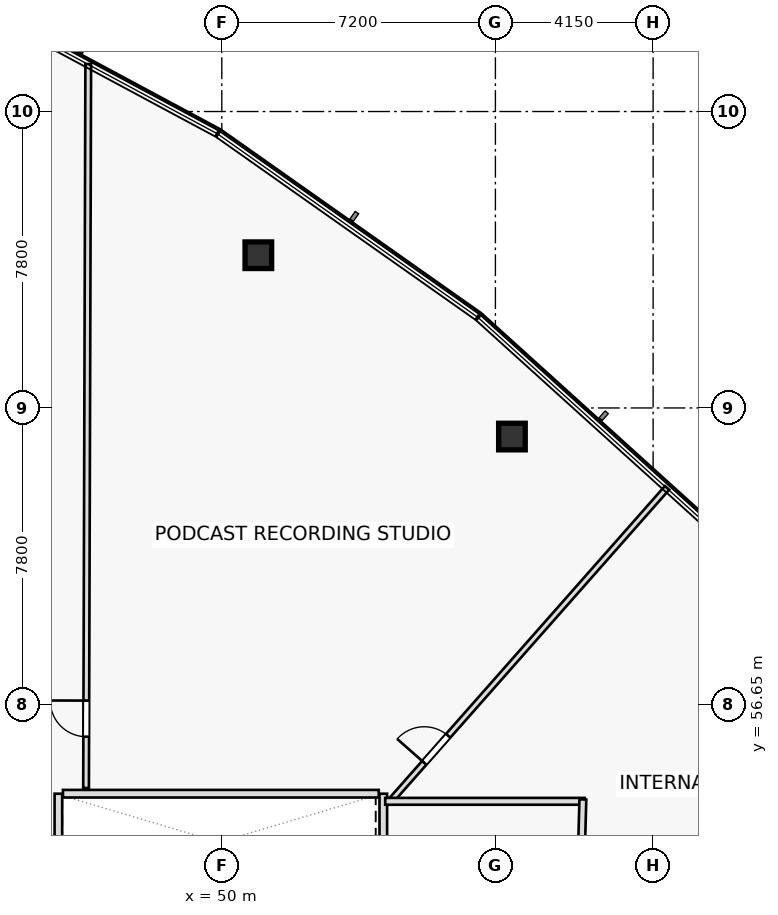
"""IFC4 building model, lengths in metres.
Left out: names, types, materials, properties, quantities, classifications, styles, units other than length and angle.
Written with IfcOpenShell. Run it as: python <this file> out.ifc"""

import sys

from ifc_helpers import new_model, si_unit, direction, frame, frame_2d, origin, origin_2d, place, context, subcontext, project, spatial, rectangle, hollow_rectangle, extrude, element, fill, save


model = new_model("IFC4")
c1 = context("Model", 3, precision=1e-05, world=origin(), true_north=direction((0.0, 1.0)))
c2 = subcontext(c1, "Body", "Model", "MODEL_VIEW")
j1 = project(units=[si_unit("LENGTHUNIT", "METRE"), si_unit("PLANEANGLEUNIT", "RADIAN")], contexts=[c1])
p1 = place(None, origin())
s1 = spatial("IfcSite", under=j1, at=p1, CompositionType="ELEMENT")
p2 = place(p1, origin())
s2 = spatial("IfcBuilding", under=s1, at=p2, CompositionType="ELEMENT")
p3 = place(p2, frame((0.0, 0.0, 86.1)))
s3 = spatial("IfcBuildingStorey", under=s2, at=p3, CompositionType="ELEMENT", Elevation=86.1)
for number, where, z_axis, x_axis in (
    (1, (57.635, 63.698, 0.0), (0.0, 0.0, 1.0), (1.0, 0.0, 0.0)),
    (2, (50.962, 68.469, 0.0), (0.0, 0.0, 1.0), (1.0, 0.0, 0.0)),
):
    element("IfcColumn", number, at=place(p3, frame(where, z_axis=z_axis, x_axis=x_axis)), inside=s3, PredefinedType="COLUMN", context=c2, shape_type="SweptSolid", body=[
        extrude(hollow_rectangle(XDim=0.7, YDim=0.7, WallThickness=0.04, at=origin_2d()), origin(), (0.0, 0.0, 1.0), 3.6),
    ])
for number, where, z_axis, x_axis in (
    (3, (45.7, 51.8, 0.0), (0.0, 0.0, 1.0), (0.0, 1.0, 0.0)),
    (4, (54.25, 51.8, 0.0), (0.0, 0.0, 1.0), (0.0, 1.0, 0.0)),
):
    element("IfcWall", number, at=place(p3, frame(where, z_axis=z_axis, x_axis=x_axis)), inside=s3, PredefinedType="PARTITIONING", context=c2, shape_type="SweptSolid", body=[
        extrude(rectangle(XDim=2.5, YDim=0.2, at=frame_2d((1.25, 0.0))), origin(), (0.0, 0.0, 1.0), 3.6),
    ])
p4 = place(p3, frame((54.435, 54.1, 0.0), z_axis=(0.0, 0.0, 1.0), x_axis=(0.661869690786, 0.74961891146, 0.0)))
e5 = element("IfcWall", 5, at=p4, inside=s3, PredefinedType="PARTITIONING", context=c2, shape_type="SweptSolid", body=[
    extrude(rectangle(XDim=11.001, YDim=0.15, at=frame_2d((5.5, 0.0))), origin(), (0.0, 0.0, 1.0), 2.975),
])
p5 = place(p4, frame((1.35, 0.0, 0.0)))
e6 = element("IfcOpeningElement", 6, at=p5, cuts=e5, PredefinedType="OPENING", context=c2, shape_type="SweptSolid", body=[
    extrude(rectangle(XDim=0.95, YDim=2.05, at=frame_2d((0.475, 1.025))), frame((0.0, 0.085, 0.0), z_axis=(0.0, -1.0, 0.0), x_axis=(1.0, 0.0, 0.0)), (0.0, 0.0, 1.0), 0.17),
])
p6 = place(p3, frame((46.428, 54.45, 0.0), z_axis=(0.0, 0.0, 1.0), x_axis=(0.002998909978, 0.999995503259, 0.0)))
e7 = element("IfcWall", 7, at=p6, inside=s3, PredefinedType="PARTITIONING", context=c2, shape_type="SweptSolid", body=[
    extrude(rectangle(XDim=19.05, YDim=0.15, at=frame_2d((9.525, 0.0))), origin(), (0.0, 0.0, 1.0), 3.025),
])
p7 = place(p6, frame((1.35, 0.0, 0.0)))
e8 = element("IfcOpeningElement", 8, at=p7, cuts=e7, PredefinedType="OPENING", context=c2, shape_type="SweptSolid", body=[
    extrude(rectangle(XDim=0.95, YDim=2.05, at=frame_2d((0.475, 1.025))), frame((0.0, 0.085, 0.0), z_axis=(0.0, -1.0, 0.0), x_axis=(1.0, 0.0, 0.0)), (0.0, 0.0, 1.0), 0.17),
])
p8 = place(p3, frame((54.3, 54.1, 0.0), z_axis=(0.0, 0.0, 1.0), x_axis=(1.0, 0.0, 0.0)))
e9 = element("IfcWall", 9, at=p8, inside=s3, PredefinedType="PARTITIONING", context=c2, shape_type="SweptSolid", body=[
    extrude(rectangle(XDim=5.25, YDim=0.18, at=frame_2d((2.625, 0.0))), origin(), (0.0, 0.0, 1.0), 2.975),
])
p9 = place(p3, frame((59.501, 54.15, 0.0), z_axis=(0.0, 0.0, 1.0), x_axis=(-0.027367567602, -0.999625437973, 0.0)))
e10 = element("IfcWall", 10, at=p9, inside=s3, PredefinedType="PARTITIONING", context=c2, shape_type="SweptSolid", body=[
    extrude(rectangle(XDim=5.852, YDim=0.18, at=frame_2d((2.926, 0.0))), origin(), (0.0, 0.0, 1.0), 2.975),
])
p10 = place(p9, frame((2.451, 0.0, 0.0)))
e11 = element("IfcOpeningElement", 11, at=p10, cuts=e10, PredefinedType="OPENING", context=c2, shape_type="SweptSolid", body=[
    extrude(rectangle(XDim=0.95, YDim=2.05, at=frame_2d((0.475, 1.025))), frame((0.0, 0.1, 0.0), z_axis=(0.0, -1.0, 0.0), x_axis=(1.0, 0.0, 0.0)), (0.0, 0.0, 1.0), 0.2),
])
p11 = place(p3, frame((45.82, 54.3, 0.0), z_axis=(0.0, 0.0, 1.0), x_axis=(1.0, 0.0, 0.0)))
e12 = element("IfcWall", 12, at=p11, inside=s3, PredefinedType="PARTITIONING", context=c2, shape_type="SweptSolid", body=[
    extrude(rectangle(XDim=8.31, YDim=0.2, at=frame_2d((4.155, 0.0))), origin(), (0.0, 0.0, 1.0), 3.6),
])
p12 = place(p5, origin())
e13 = element("IfcDoor", 13, at=p12, inside=s3, OperationType="SINGLE_SWING_LEFT", PredefinedType="DOOR", context=c2, shape_type="SweptSolid", body=[
    extrude(rectangle(XDim=0.95, YDim=2.05, at=frame_2d((0.475, 1.025))), frame((0.0, 0.025, 0.0), z_axis=(0.0, -1.0, 0.0), x_axis=(1.0, 0.0, 0.0)), (0.0, 0.0, 1.0), 0.05),
])
fill(e6, e13)
p13 = place(p7, origin())
e14 = element("IfcDoor", 14, at=p13, inside=s3, OperationType="SINGLE_SWING_RIGHT", PredefinedType="DOOR", context=c2, shape_type="SweptSolid", body=[
    extrude(rectangle(XDim=0.95, YDim=2.05, at=frame_2d((0.475, 1.025))), frame((0.0, 0.025, 0.0), z_axis=(0.0, -1.0, 0.0), x_axis=(1.0, 0.0, 0.0)), (0.0, 0.0, 1.0), 0.05),
])
fill(e8, e14)
save(model, sys.argv[1])
